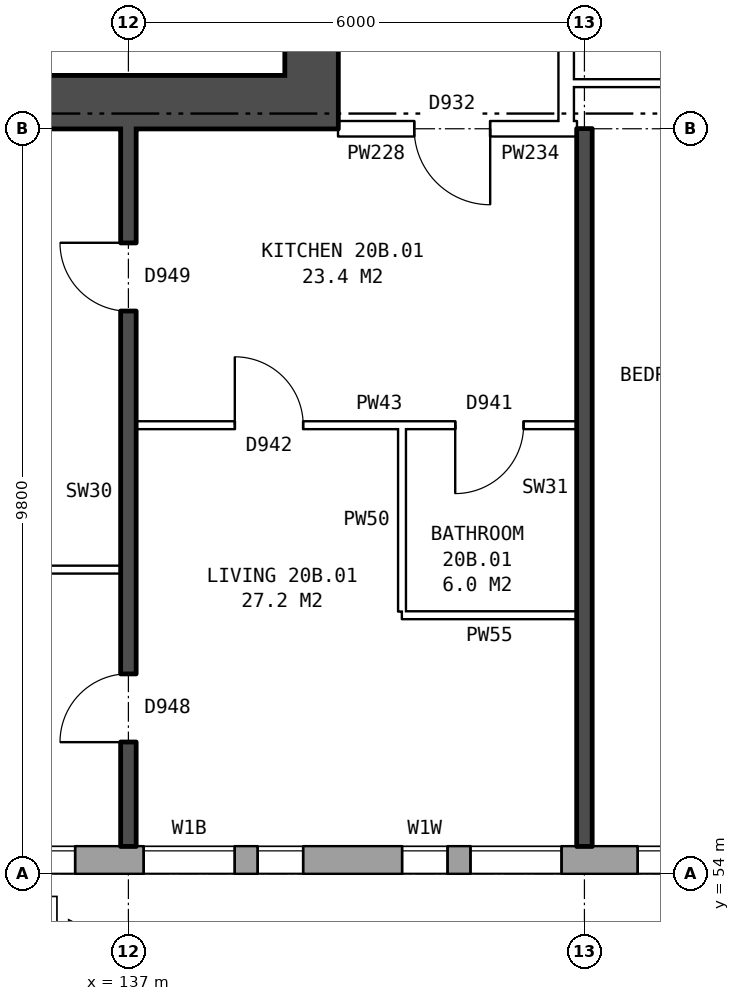
"""IFC4 building model, lengths in metres.
Left out: names, types, materials, properties, quantities, classifications, styles, units other than length and angle.
Written with IfcOpenShell. Run it as: python <this file> out.ifc"""

import sys

from ifc_helpers import new_model, si_unit, direction, frame, frame_2d, origin, place, context, subcontext, project, spatial, rectangle, extrude, element, fill, save


model = new_model("IFC4")
c1 = context("Model", 3, precision=1e-05, world=origin(), true_north=direction((0.0, 1.0)))
c2 = subcontext(c1, "Body", "Model", "MODEL_VIEW")
j1 = project(units=[si_unit("LENGTHUNIT", "METRE"), si_unit("PLANEANGLEUNIT", "RADIAN")], contexts=[c1])
p1 = place(None, origin())
s1 = spatial("IfcSite", under=j1, at=p1, CompositionType="ELEMENT")
p2 = place(p1, origin())
s2 = spatial("IfcBuilding", under=s1, at=p2, CompositionType="ELEMENT")
p3 = place(p2, frame((0.0, 0.0, 74.7)))
s3 = spatial("IfcBuildingStorey", under=s2, at=p3, CompositionType="ELEMENT", Elevation=74.7)
p4 = place(p3, frame((134.075, 54.18, 0.0), z_axis=(0.0, 0.0, 1.0), x_axis=(1.0, 0.0, 0.0)))
e1 = element("IfcWall", 1, at=p4, inside=s3, PredefinedType="STANDARD", context=c2, shape_type="SweptSolid", body=[
    extrude(rectangle(XDim=38.101, YDim=0.36, at=frame_2d((19.05, 0.0))), origin(), (0.0, 0.0, 1.0), 2.85),
])
p5 = place(p4, frame((0.625, 0.0, 0.8)))
e2 = element("IfcOpeningElement", 2, at=p5, cuts=e1, PredefinedType="OPENING", context=c2, shape_type="SweptSolid", body=[
    extrude(rectangle(XDim=1.6, YDim=1.8, at=frame_2d((0.8, 0.9))), frame((0.0, 0.19, 0.0), z_axis=(0.0, -1.0, 0.0), x_axis=(1.0, 0.0, 0.0)), (0.0, 0.0, 1.0), 0.38),
])
p6 = place(p4, frame((3.125, 0.0, 0.8)))
e3 = element("IfcOpeningElement", 3, at=p6, cuts=e1, PredefinedType="OPENING", context=c2, shape_type="SweptSolid", body=[
    extrude(rectangle(XDim=1.2, YDim=1.8, at=frame_2d((0.6, 0.9))), frame((0.0, 0.19, 0.0), z_axis=(0.0, -1.0, 0.0), x_axis=(1.0, 0.0, 0.0)), (0.0, 0.0, 1.0), 0.38),
])
p7 = place(p4, frame((4.625, 0.0, 1.6)))
e4 = element("IfcOpeningElement", 4, at=p7, cuts=e1, PredefinedType="OPENING", context=c2, shape_type="SweptSolid", body=[
    extrude(rectangle(XDim=0.6, YDim=0.9, at=frame_2d((0.3, 0.45))), frame((0.0, 0.19, 0.0), z_axis=(0.0, -1.0, 0.0), x_axis=(1.0, 0.0, 0.0)), (0.0, 0.0, 1.0), 0.38),
])
p8 = place(p4, frame((9.625, 0.0, 0.8)))
e5 = element("IfcOpeningElement", 5, at=p8, cuts=e1, PredefinedType="OPENING", context=c2, shape_type="SweptSolid", body=[
    extrude(rectangle(XDim=1.6, YDim=1.8, at=frame_2d((0.8, 0.9))), frame((0.0, 0.19, 0.0), z_axis=(0.0, -1.0, 0.0), x_axis=(1.0, 0.0, 0.0)), (0.0, 0.0, 1.0), 0.38),
])
p9 = place(p4, frame((12.625, 0.0, 0.8)))
e6 = element("IfcOpeningElement", 6, at=p9, cuts=e1, PredefinedType="OPENING", context=c2, shape_type="SweptSolid", body=[
    extrude(rectangle(XDim=1.6, YDim=1.8, at=frame_2d((0.8, 0.9))), frame((0.0, 0.19, 0.0), z_axis=(0.0, -1.0, 0.0), x_axis=(1.0, 0.0, 0.0)), (0.0, 0.0, 1.0), 0.38),
])
p10 = place(p4, frame((15.625, 0.0, 0.8)))
e7 = element("IfcOpeningElement", 7, at=p10, cuts=e1, PredefinedType="OPENING", context=c2, shape_type="SweptSolid", body=[
    extrude(rectangle(XDim=1.6, YDim=1.8, at=frame_2d((0.8, 0.9))), frame((0.0, 0.19, 0.0), z_axis=(0.0, -1.0, 0.0), x_axis=(1.0, 0.0, 0.0)), (0.0, 0.0, 1.0), 0.38),
])
p11 = place(p4, frame((18.625, 0.0, 0.8)))
e8 = element("IfcOpeningElement", 8, at=p11, cuts=e1, PredefinedType="OPENING", context=c2, shape_type="SweptSolid", body=[
    extrude(rectangle(XDim=1.6, YDim=1.8, at=frame_2d((0.8, 0.9))), frame((0.0, 0.19, 0.0), z_axis=(0.0, -1.0, 0.0), x_axis=(1.0, 0.0, 0.0)), (0.0, 0.0, 1.0), 0.38),
])
p12 = place(p4, frame((21.625, 0.0, 0.8)))
e9 = element("IfcOpeningElement", 9, at=p12, cuts=e1, PredefinedType="OPENING", context=c2, shape_type="SweptSolid", body=[
    extrude(rectangle(XDim=1.6, YDim=1.8, at=frame_2d((0.8, 0.9))), frame((0.0, 0.19, 0.0), z_axis=(0.0, -1.0, 0.0), x_axis=(1.0, 0.0, 0.0)), (0.0, 0.0, 1.0), 0.38),
])
p13 = place(p4, frame((24.625, 0.0, 0.8)))
e10 = element("IfcOpeningElement", 10, at=p13, cuts=e1, PredefinedType="OPENING", context=c2, shape_type="SweptSolid", body=[
    extrude(rectangle(XDim=1.6, YDim=1.8, at=frame_2d((0.8, 0.9))), frame((0.0, 0.19, 0.0), z_axis=(0.0, -1.0, 0.0), x_axis=(1.0, 0.0, 0.0)), (0.0, 0.0, 1.0), 0.38),
])
p14 = place(p4, frame((27.625, 0.0, 0.8)))
e11 = element("IfcOpeningElement", 11, at=p14, cuts=e1, PredefinedType="OPENING", context=c2, shape_type="SweptSolid", body=[
    extrude(rectangle(XDim=1.6, YDim=1.8, at=frame_2d((0.8, 0.9))), frame((0.0, 0.19, 0.0), z_axis=(0.0, -1.0, 0.0), x_axis=(1.0, 0.0, 0.0)), (0.0, 0.0, 1.0), 0.38),
])
p15 = place(p4, frame((29.525, 0.0, 0.8)))
e12 = element("IfcOpeningElement", 12, at=p15, cuts=e1, PredefinedType="OPENING", context=c2, shape_type="SweptSolid", body=[
    extrude(rectangle(XDim=1.0, YDim=1.8, at=frame_2d((0.5, 0.9))), frame((0.0, 0.19, 0.0), z_axis=(0.0, -1.0, 0.0), x_axis=(1.0, 0.0, 0.0)), (0.0, 0.0, 1.0), 0.38),
])
p16 = place(p4, frame((33.625, 0.0, 0.8)))
e13 = element("IfcOpeningElement", 13, at=p16, cuts=e1, PredefinedType="OPENING", context=c2, shape_type="SweptSolid", body=[
    extrude(rectangle(XDim=1.6, YDim=1.8, at=frame_2d((0.8, 0.9))), frame((0.0, 0.19, 0.0), z_axis=(0.0, -1.0, 0.0), x_axis=(1.0, 0.0, 0.0)), (0.0, 0.0, 1.0), 0.38),
])
p17 = place(p4, frame((6.525, 0.0, 0.8)))
e14 = element("IfcOpeningElement", 14, at=p17, cuts=e1, PredefinedType="OPENING", context=c2, shape_type="SweptSolid", body=[
    extrude(rectangle(XDim=0.6, YDim=0.9, at=frame_2d((0.3, 0.45))), frame((0.0, 0.19, 0.0), z_axis=(0.0, -1.0, 0.0), x_axis=(1.0, 0.0, 0.0)), (0.0, 0.0, 1.0), 0.38),
])
p18 = place(p4, frame((7.425, 0.0, 0.8)))
e15 = element("IfcOpeningElement", 15, at=p18, cuts=e1, PredefinedType="OPENING", context=c2, shape_type="SweptSolid", body=[
    extrude(rectangle(XDim=1.2, YDim=1.8, at=frame_2d((0.6, 0.9))), frame((0.0, 0.19, 0.0), z_axis=(0.0, -1.0, 0.0), x_axis=(1.0, 0.0, 0.0)), (0.0, 0.0, 1.0), 0.38),
])
p19 = place(p4, frame((30.825, 0.0, 0.8)))
e16 = element("IfcOpeningElement", 16, at=p19, cuts=e1, PredefinedType="OPENING", context=c2, shape_type="SweptSolid", body=[
    extrude(rectangle(XDim=0.6, YDim=0.9, at=frame_2d((0.3, 0.45))), frame((0.0, 0.19, 0.0), z_axis=(0.0, -1.0, 0.0), x_axis=(1.0, 0.0, 0.0)), (0.0, 0.0, 1.0), 0.38),
])
p20 = place(p3, frame((139.41, 64.5, 0.0), z_axis=(0.0, 0.0, 1.0), x_axis=(0.0, 1.0, 0.0)))
e17 = element("IfcWall", 17, at=p20, inside=s3, PredefinedType="SHEAR", context=c2, shape_type="SweptSolid", body=[
    extrude(rectangle(XDim=11.0, YDim=0.7, at=frame_2d((5.5, 0.0))), origin(), (0.0, 0.0, 1.0), 2.85),
])
p21 = place(p20, frame((0.625, 0.0, 0.0)))
e18 = element("IfcOpeningElement", 18, at=p21, cuts=e17, PredefinedType="OPENING", context=c2, shape_type="SweptSolid", body=[
    extrude(rectangle(XDim=1.1, YDim=2.1, at=frame_2d((0.55, 1.05))), frame((0.0, 0.36, 0.0), z_axis=(0.0, -1.0, 0.0), x_axis=(1.0, 0.0, 0.0)), (0.0, 0.0, 1.0), 0.72),
])
p22 = place(p20, frame((9.2, 0.0, 0.0)))
e19 = element("IfcOpeningElement", 19, at=p22, cuts=e17, PredefinedType="OPENING", context=c2, shape_type="SweptSolid", body=[
    extrude(rectangle(XDim=1.1, YDim=2.1, at=frame_2d((0.55, 1.05))), frame((0.0, 0.36, 0.0), z_axis=(0.0, -1.0, 0.0), x_axis=(1.0, 0.0, 0.0)), (0.0, 0.0, 1.0), 0.72),
])
p23 = place(p20, frame((7.425, 0.0, 0.0)))
e20 = element("IfcOpeningElement", 20, at=p23, cuts=e17, PredefinedType="OPENING", context=c2, shape_type="SweptSolid", body=[
    extrude(rectangle(XDim=0.85, YDim=2.1, at=frame_2d((0.425, 1.05))), frame((0.0, 0.36, 0.0), z_axis=(0.0, -1.0, 0.0), x_axis=(1.0, 0.0, 0.0)), (0.0, 0.0, 1.0), 0.72),
])
p24 = place(p3, frame((139.76, 64.15, 0.0), z_axis=(0.0, 0.0, 1.0), x_axis=(-1.0, 0.0, 0.0)))
e21 = element("IfcWall", 21, at=p24, inside=s3, PredefinedType="SHEAR", context=c2, shape_type="SweptSolid", body=[
    extrude(rectangle(XDim=8.4, YDim=0.7, at=frame_2d((4.2, 0.0))), origin(), (0.0, 0.0, 1.0), 2.85),
])
p25 = place(p3, frame((142.76, 63.9, 0.0), z_axis=(0.0, 0.0, 1.0), x_axis=(0.0, 1.0, 0.0)))
e22 = element("IfcWall", 22, at=p25, inside=s3, PredefinedType="PARTITIONING", context=c2, shape_type="SweptSolid", body=[
    extrude(rectangle(XDim=12.2, YDim=0.2, at=frame_2d((6.1, 0.0))), origin(), (0.0, 0.0, 1.0), 2.85),
])
p26 = place(p25, frame((5.1, 0.0, 0.0)))
e23 = element("IfcOpeningElement", 23, at=p26, cuts=e22, PredefinedType="OPENING", context=c2, shape_type="SweptSolid", body=[
    extrude(rectangle(XDim=2.0, YDim=2.1, at=frame_2d((1.0, 1.05))), frame((0.0, 0.11, 0.0), z_axis=(0.0, -1.0, 0.0), x_axis=(1.0, 0.0, 0.0)), (0.0, 0.0, 1.0), 0.22),
])
p27 = place(p3, frame((140.6, 57.4, 0.0), z_axis=(0.0, 0.0, 1.0), x_axis=(1.0, 0.0, 0.0)))
e24 = element("IfcWall", 24, at=p27, inside=s3, PredefinedType="PARTITIONING", context=c2, shape_type="SweptSolid", body=[
    extrude(rectangle(XDim=2.3, YDim=0.1, at=frame_2d((1.15, 0.0))), origin(), (0.0, 0.0, 1.0), 2.85),
])
p28 = place(p3, frame((131.36, 58.0, 0.0), z_axis=(0.0, 0.0, 1.0), x_axis=(1.0, 0.0, 0.0)))
e25 = element("IfcWall", 25, at=p28, inside=s3, PredefinedType="PARTITIONING", context=c2, shape_type="SweptSolid", body=[
    extrude(rectangle(XDim=5.54, YDim=0.1, at=frame_2d((2.77, 0.0))), origin(), (0.0, 0.0, 1.0), 2.85),
])
p29 = place(p3, frame((137.1, 59.9, 0.0), z_axis=(0.0, 0.0, 1.0), x_axis=(1.0, 0.0, 0.0)))
e26 = element("IfcWall", 26, at=p29, inside=s3, PredefinedType="PARTITIONING", context=c2, shape_type="SweptSolid", body=[
    extrude(rectangle(XDim=5.8, YDim=0.1, at=frame_2d((2.9, 0.0))), origin(), (0.0, 0.0, 1.0), 2.85),
])
p30 = place(p29, frame((1.3, 0.0, 0.0)))
e27 = element("IfcOpeningElement", 27, at=p30, cuts=e26, PredefinedType="OPENING", context=c2, shape_type="SweptSolid", body=[
    extrude(rectangle(XDim=0.9, YDim=2.1, at=frame_2d((0.45, 1.05))), frame((0.0, 0.06, 0.0), z_axis=(0.0, -1.0, 0.0), x_axis=(1.0, 0.0, 0.0)), (0.0, 0.0, 1.0), 0.12),
])
p31 = place(p29, frame((4.2, 0.0, 0.0)))
e28 = element("IfcOpeningElement", 28, at=p31, cuts=e26, PredefinedType="OPENING", context=c2, shape_type="SweptSolid", body=[
    extrude(rectangle(XDim=0.9, YDim=2.1, at=frame_2d((0.45, 1.05))), frame((0.0, 0.06, 0.0), z_axis=(0.0, -1.0, 0.0), x_axis=(1.0, 0.0, 0.0)), (0.0, 0.0, 1.0), 0.12),
])
p32 = place(p3, frame((139.76, 63.8, 0.0), z_axis=(0.0, 0.0, 1.0), x_axis=(1.0, 0.0, 0.0)))
e29 = element("IfcWall", 29, at=p32, inside=s3, PredefinedType="PARTITIONING", context=c2, shape_type="SweptSolid", body=[
    extrude(rectangle(XDim=3.0, YDim=0.2, at=frame_2d((1.5, 0.0))), origin(), (0.0, 0.0, 1.0), 2.85),
])
p33 = place(p32, frame((1.0, 0.0, 0.0)))
e30 = element("IfcOpeningElement", 30, at=p33, cuts=e29, PredefinedType="OPENING", context=c2, shape_type="SweptSolid", body=[
    extrude(rectangle(XDim=1.0, YDim=2.1, at=frame_2d((0.5, 1.05))), frame((0.0, 0.11, 0.0), z_axis=(0.0, -1.0, 0.0), x_axis=(1.0, 0.0, 0.0)), (0.0, 0.0, 1.0), 0.22),
])
p34 = place(p3, frame((142.76, 63.8, 0.0), z_axis=(0.0, 0.0, 1.0), x_axis=(1.0, 0.0, 0.0)))
e31 = element("IfcWall", 31, at=p34, inside=s3, PredefinedType="PARTITIONING", context=c2, shape_type="SweptSolid", body=[
    extrude(rectangle(XDim=0.14, YDim=0.2, at=frame_2d((0.07, 0.0))), origin(), (0.0, 0.0, 1.0), 2.85),
])
p35 = place(p3, frame((142.76, 64.4, 0.0), z_axis=(0.0, 0.0, 1.0), x_axis=(1.0, 0.0, 0.0)))
e32 = element("IfcWall", 32, at=p35, inside=s3, PredefinedType="PARTITIONING", context=c2, shape_type="SweptSolid", body=[
    extrude(rectangle(XDim=3.24, YDim=0.1, at=frame_2d((1.62, 0.0))), origin(), (0.0, 0.0, 1.0), 2.85),
])
p36 = place(p3, frame((137.0, 54.36, 0.0), z_axis=(0.0, 0.0, 1.0), x_axis=(0.0, 1.0, 0.0)))
e33 = element("IfcWall", 33, at=p36, inside=s3, PredefinedType="SOLIDWALL", context=c2, shape_type="SweptSolid", body=[
    extrude(rectangle(XDim=9.44, YDim=0.2, at=frame_2d((4.72, 0.0))), origin(), (0.0, 0.0, 1.0), 2.85),
])
p37 = place(p36, frame((1.37, 0.0, 0.0)))
e34 = element("IfcOpeningElement", 34, at=p37, cuts=e33, PredefinedType="OPENING", context=c2, shape_type="SweptSolid", body=[
    extrude(rectangle(XDim=0.9, YDim=2.1, at=frame_2d((0.45, 1.05))), frame((0.0, 0.11, 0.0), z_axis=(0.0, -1.0, 0.0), x_axis=(1.0, 0.0, 0.0)), (0.0, 0.0, 1.0), 0.22),
])
p38 = place(p36, frame((7.04, 0.0, 0.0)))
e35 = element("IfcOpeningElement", 35, at=p38, cuts=e33, PredefinedType="OPENING", context=c2, shape_type="SweptSolid", body=[
    extrude(rectangle(XDim=0.9, YDim=2.1, at=frame_2d((0.45, 1.05))), frame((0.0, 0.11, 0.0), z_axis=(0.0, -1.0, 0.0), x_axis=(1.0, 0.0, 0.0)), (0.0, 0.0, 1.0), 0.22),
])
p39 = place(p3, frame((140.6, 57.45, 0.0), z_axis=(0.0, 0.0, 1.0), x_axis=(0.0, 1.0, 0.0)))
e36 = element("IfcWall", 36, at=p39, inside=s3, PredefinedType="PARTITIONING", context=c2, shape_type="SweptSolid", body=[
    extrude(rectangle(XDim=2.4, YDim=0.1, at=frame_2d((1.2, 0.0))), origin(), (0.0, 0.0, 1.0), 2.85),
])
p40 = place(p3, frame((143.0, 54.36, 0.0), z_axis=(0.0, 0.0, 1.0), x_axis=(0.0, 1.0, 0.0)))
e37 = element("IfcWall", 37, at=p40, inside=s3, PredefinedType="SOLIDWALL", context=c2, shape_type="SweptSolid", body=[
    extrude(rectangle(XDim=9.44, YDim=0.2, at=frame_2d((4.72, 0.0))), origin(), (0.0, 0.0, 1.0), 2.85),
])
p41 = place(p5, origin())
e38 = element("IfcWindow", 38, at=p41, inside=s3, PartitioningType="SINGLE_PANEL", PredefinedType="WINDOW", context=c2, shape_type="SweptSolid", body=[
    extrude(rectangle(XDim=1.6, YDim=1.8, at=frame_2d((0.8, 0.9))), frame((0.0, 0.15, 0.0), z_axis=(0.0, -1.0, 0.0), x_axis=(1.0, 0.0, 0.0)), (0.0, 0.0, 1.0), 0.06),
])
fill(e2, e38)
p42 = place(p6, origin())
e39 = element("IfcWindow", 39, at=p42, inside=s3, PartitioningType="SINGLE_PANEL", PredefinedType="WINDOW", context=c2, shape_type="SweptSolid", body=[
    extrude(rectangle(XDim=1.2, YDim=1.8, at=frame_2d((0.6, 0.9))), frame((0.0, 0.15, 0.0), z_axis=(0.0, -1.0, 0.0), x_axis=(1.0, 0.0, 0.0)), (0.0, 0.0, 1.0), 0.06),
])
fill(e3, e39)
p43 = place(p7, origin())
e40 = element("IfcWindow", 40, at=p43, inside=s3, PartitioningType="SINGLE_PANEL", PredefinedType="WINDOW", context=c2, shape_type="SweptSolid", body=[
    extrude(rectangle(XDim=0.6, YDim=0.9, at=frame_2d((0.3, 0.45))), frame((0.0, 0.15, 0.0), z_axis=(0.0, -1.0, 0.0), x_axis=(1.0, 0.0, 0.0)), (0.0, 0.0, 1.0), 0.06),
])
fill(e4, e40)
p44 = place(p8, origin())
e41 = element("IfcWindow", 41, at=p44, inside=s3, PartitioningType="SINGLE_PANEL", PredefinedType="WINDOW", context=c2, shape_type="SweptSolid", body=[
    extrude(rectangle(XDim=1.6, YDim=1.8, at=frame_2d((0.8, 0.9))), frame((0.0, 0.15, 0.0), z_axis=(0.0, -1.0, 0.0), x_axis=(1.0, 0.0, 0.0)), (0.0, 0.0, 1.0), 0.06),
])
fill(e5, e41)
p45 = place(p37, origin())
e42 = element("IfcDoor", 42, at=p45, inside=s3, OperationType="SINGLE_SWING_LEFT", PredefinedType="DOOR", context=c2, shape_type="SweptSolid", body=[
    extrude(rectangle(XDim=0.9, YDim=2.1, at=frame_2d((0.45, 1.05))), frame((0.0, 0.025, 0.0), z_axis=(0.0, -1.0, 0.0), x_axis=(1.0, 0.0, 0.0)), (0.0, 0.0, 1.0), 0.05),
])
fill(e34, e42)
p46 = place(p38, origin())
e43 = element("IfcDoor", 43, at=p46, inside=s3, OperationType="SINGLE_SWING_RIGHT", PredefinedType="DOOR", context=c2, shape_type="SweptSolid", body=[
    extrude(rectangle(XDim=0.9, YDim=2.1, at=frame_2d((0.45, 1.05))), frame((0.0, 0.025, 0.0), z_axis=(0.0, -1.0, 0.0), x_axis=(1.0, 0.0, 0.0)), (0.0, 0.0, 1.0), 0.05),
])
fill(e35, e43)
p47 = place(p33, frame((1.0, 0.0, 0.0), z_axis=(0.0, 0.0, 1.0), x_axis=(-1.0, 0.0, 0.0)))
e44 = element("IfcDoor", 44, at=p47, inside=s3, OperationType="SINGLE_SWING_LEFT", PredefinedType="DOOR", context=c2, shape_type="SweptSolid", body=[
    extrude(rectangle(XDim=1.0, YDim=2.1, at=frame_2d((0.5, 1.05))), frame((0.0, 0.025, 0.0), z_axis=(0.0, -1.0, 0.0), x_axis=(1.0, 0.0, 0.0)), (0.0, 0.0, 1.0), 0.05),
])
fill(e30, e44)
p48 = place(p30, origin())
e45 = element("IfcDoor", 45, at=p48, inside=s3, OperationType="SINGLE_SWING_LEFT", PredefinedType="DOOR", context=c2, shape_type="SweptSolid", body=[
    extrude(rectangle(XDim=0.9, YDim=2.1, at=frame_2d((0.45, 1.05))), frame((0.0, 0.025, 0.0), z_axis=(0.0, -1.0, 0.0), x_axis=(1.0, 0.0, 0.0)), (0.0, 0.0, 1.0), 0.05),
])
fill(e27, e45)
p49 = place(p31, frame((0.9, 0.0, 0.0), z_axis=(0.0, 0.0, 1.0), x_axis=(-1.0, 0.0, 0.0)))
e46 = element("IfcDoor", 46, at=p49, inside=s3, OperationType="SINGLE_SWING_RIGHT", PredefinedType="DOOR", context=c2, shape_type="SweptSolid", body=[
    extrude(rectangle(XDim=0.9, YDim=2.1, at=frame_2d((0.45, 1.05))), frame((0.0, 0.025, 0.0), z_axis=(0.0, -1.0, 0.0), x_axis=(1.0, 0.0, 0.0)), (0.0, 0.0, 1.0), 0.05),
])
fill(e28, e46)
p50 = place(p17, origin())
e47 = element("IfcWindow", 47, at=p50, inside=s3, PartitioningType="SINGLE_PANEL", PredefinedType="WINDOW", context=c2, shape_type="SweptSolid", body=[
    extrude(rectangle(XDim=0.6, YDim=0.9, at=frame_2d((0.3, 0.45))), frame((0.0, 0.15, 0.0), z_axis=(0.0, -1.0, 0.0), x_axis=(1.0, 0.0, 0.0)), (0.0, 0.0, 1.0), 0.06),
])
fill(e14, e47)
p51 = place(p18, origin())
e48 = element("IfcWindow", 48, at=p51, inside=s3, PartitioningType="SINGLE_PANEL", PredefinedType="WINDOW", context=c2, shape_type="SweptSolid", body=[
    extrude(rectangle(XDim=1.2, YDim=1.8, at=frame_2d((0.6, 0.9))), frame((0.0, 0.15, 0.0), z_axis=(0.0, -1.0, 0.0), x_axis=(1.0, 0.0, 0.0)), (0.0, 0.0, 1.0), 0.06),
])
fill(e15, e48)
save(model, sys.argv[1])
